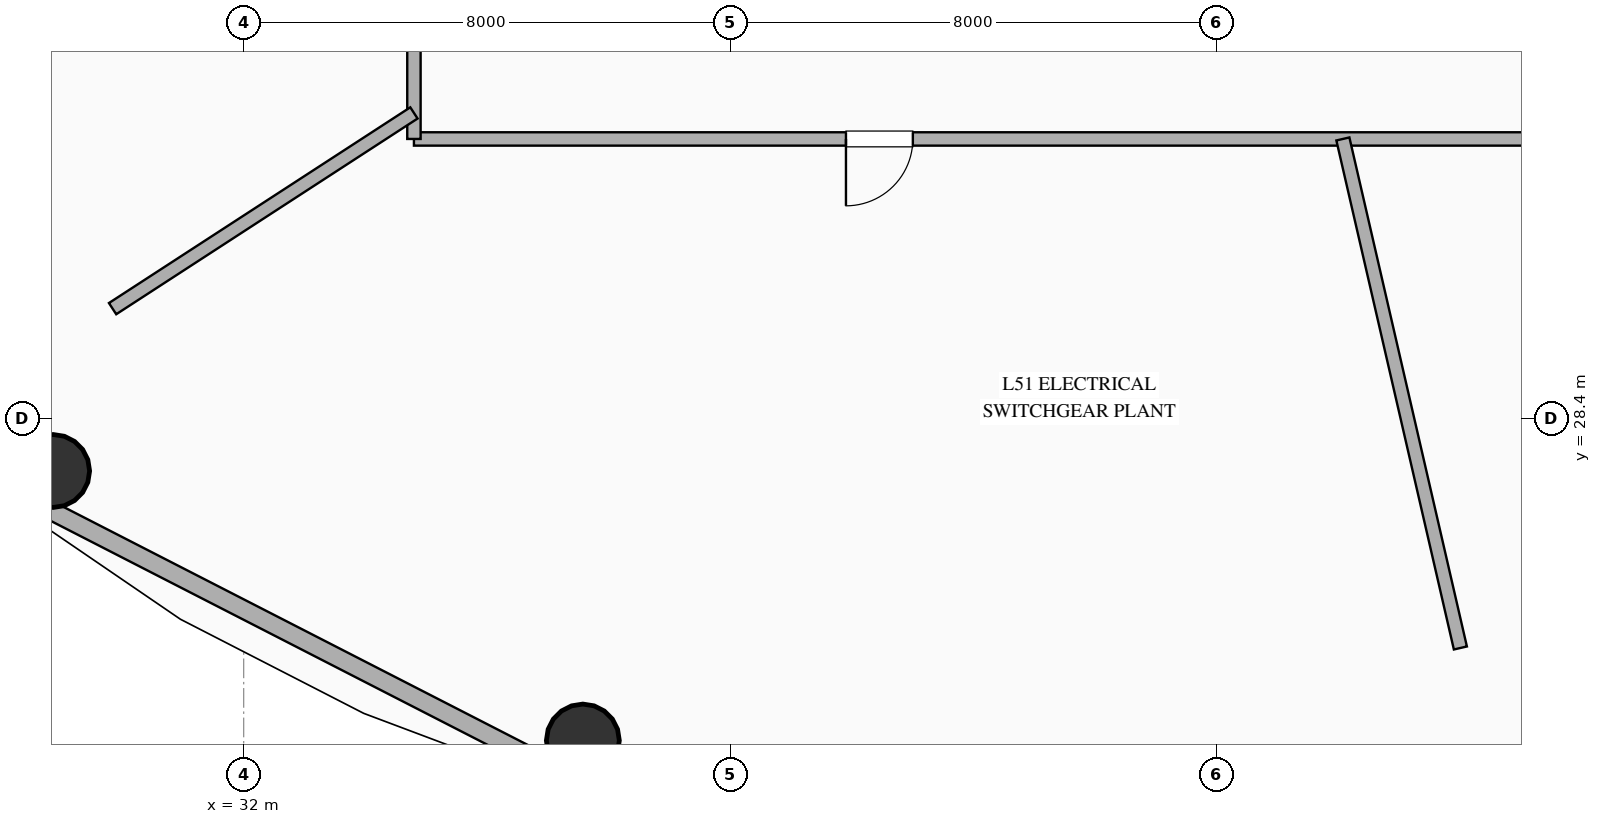
"""IFC4 building model, lengths in metres.
Left out: names, types, materials, properties, quantities, classifications, styles, units other than length and angle.
Written with IfcOpenShell. Run it as: python <this file> out.ifc"""

import sys

from ifc_helpers import new_model, si_unit, direction, frame, frame_2d, origin, origin_2d, place, context, subcontext, project, spatial, rectangle, hollow_circle, extrude, element, fill, save


model = new_model("IFC4")
c1 = context("Model", 3, precision=1e-05, world=origin(), true_north=direction((0.0, 1.0)))
c2 = subcontext(c1, "Body", "Model", "MODEL_VIEW")
j1 = project(units=[si_unit("LENGTHUNIT", "METRE"), si_unit("PLANEANGLEUNIT", "RADIAN")], contexts=[c1])
p1 = place(None, origin())
s1 = spatial("IfcSite", under=j1, at=p1, CompositionType="ELEMENT")
p2 = place(p1, origin())
s2 = spatial("IfcBuilding", under=s1, at=p2, CompositionType="ELEMENT")
p3 = place(p2, frame((0.0, 0.0, 201.0)))
s3 = spatial("IfcBuildingStorey", under=s2, at=p3, CompositionType="ELEMENT", Elevation=201.0)
for number, where, z_axis, x_axis in (
    (1, (28.866, 27.54, 0.0), (0.0, 0.0, 1.0), (1.0, 0.0, 0.0)),
    (2, (37.578, 23.107, 0.0), (0.0, 0.0, 1.0), (1.0, 0.0, 0.0)),
):
    element("IfcColumn", number, at=place(p3, frame(where, z_axis=z_axis, x_axis=x_axis)), inside=s3, PredefinedType="COLUMN", context=c2, shape_type="SweptSolid", body=[
        extrude(hollow_circle(Radius=0.6, WallThickness=0.032, at=origin_2d()), origin(), (0.0, 0.0, 1.0), 5.15),
    ])
p4 = place(p3, frame((28.424, 27.094, 0.0), z_axis=(0.0, 0.0, 1.0), x_axis=(0.889872523182, -0.456209263919, 0.0)))
e3 = element("IfcWall", 3, at=p4, inside=s3, PredefinedType="SOLIDWALL", context=c2, shape_type="SweptSolid", body=[
    extrude(rectangle(XDim=10.016, YDim=0.3, at=frame_2d((5.008, 0.0))), origin(), (0.0, 0.0, 1.0), 5.15),
])
p5 = place(p3, frame((61.2, 33.0, 0.0), z_axis=(0.0, 0.0, 1.0), x_axis=(-1.0, 0.0, 0.0)))
e4 = element("IfcWall", 4, at=p5, inside=s3, PredefinedType="SOLIDWALL", context=c2, shape_type="SweptSolid", body=[
    extrude(rectangle(XDim=26.4, YDim=0.22, at=frame_2d((13.2, 0.0))), origin(), (0.0, 0.0, 1.0), 3.45),
])
p6 = place(p5, frame((18.195, 0.0, 0.0)))
e5 = element("IfcOpeningElement", 5, at=p6, cuts=e4, PredefinedType="OPENING", context=c2, shape_type="SweptSolid", body=[
    extrude(rectangle(XDim=1.1, YDim=2.15, at=frame_2d((0.55, 1.075))), frame((0.0, 0.12, 0.0), z_axis=(0.0, -1.0, 0.0), x_axis=(1.0, 0.0, 0.0)), (0.0, 0.0, 1.0), 0.24),
])
p7 = place(p5, frame((5.028, 0.0, 0.0)))
e6 = element("IfcOpeningElement", 6, at=p7, cuts=e4, PredefinedType="OPENING", context=c2, shape_type="SweptSolid", body=[
    extrude(rectangle(XDim=1.1, YDim=2.15, at=frame_2d((0.55, 1.075))), frame((0.0, 0.12, 0.0), z_axis=(0.0, -1.0, 0.0), x_axis=(1.0, 0.0, 0.0)), (0.0, 0.0, 1.0), 0.24),
])
p8 = place(p3, frame((34.8, 33.0, 0.0), z_axis=(0.0, 0.0, 1.0), x_axis=(0.0, 1.0, 0.0)))
e7 = element("IfcWall", 7, at=p8, inside=s3, PredefinedType="SOLIDWALL", context=c2, shape_type="SweptSolid", body=[
    extrude(rectangle(XDim=18.0, YDim=0.22, at=frame_2d((9.0, 0.0))), origin(), (0.0, 0.0, 1.0), 3.45),
])
p9 = place(p8, frame((6.179, 0.0, 0.0)))
e8 = element("IfcOpeningElement", 8, at=p9, cuts=e7, PredefinedType="OPENING", context=c2, shape_type="SweptSolid", body=[
    extrude(rectangle(XDim=1.1, YDim=2.15, at=frame_2d((0.55, 1.075))), frame((0.0, 0.12, 0.0), z_axis=(0.0, -1.0, 0.0), x_axis=(1.0, 0.0, 0.0)), (0.0, 0.0, 1.0), 0.24),
])
p10 = place(p3, frame((50.078, 33.0, 0.0), z_axis=(0.0, 0.0, 1.0), x_axis=(0.224950824014, -0.974370117961, 0.0)))
e9 = element("IfcWall", 9, at=p10, inside=s3, PredefinedType="SOLIDWALL", context=c2, shape_type="SweptSolid", body=[
    extrude(rectangle(XDim=8.591, YDim=0.22, at=frame_2d((4.296, 0.0))), origin(), (0.0, 0.0, 1.0), 3.45),
])
p11 = place(p3, frame((34.8, 33.428, 0.0), z_axis=(0.0, 0.0, 1.0), x_axis=(-0.838670079977, -0.54463978642, 0.0)))
e10 = element("IfcWall", 10, at=p11, inside=s3, PredefinedType="SOLIDWALL", context=c2, shape_type="SweptSolid", body=[
    extrude(rectangle(XDim=5.909, YDim=0.22, at=frame_2d((2.955, 0.0))), origin(), (0.0, 0.0, 1.0), 3.45),
])
p12 = place(p6, origin())
e11 = element("IfcDoor", 11, at=p12, inside=s3, OperationType="SINGLE_SWING_RIGHT", PredefinedType="DOOR", context=c2, shape_type="SweptSolid", body=[
    extrude(rectangle(XDim=1.1, YDim=2.15, at=frame_2d((0.55, 1.075))), frame((0.0, 0.025, 0.0), z_axis=(0.0, -1.0, 0.0), x_axis=(1.0, 0.0, 0.0)), (0.0, 0.0, 1.0), 0.05),
])
fill(e5, e11)
save(model, sys.argv[1])
